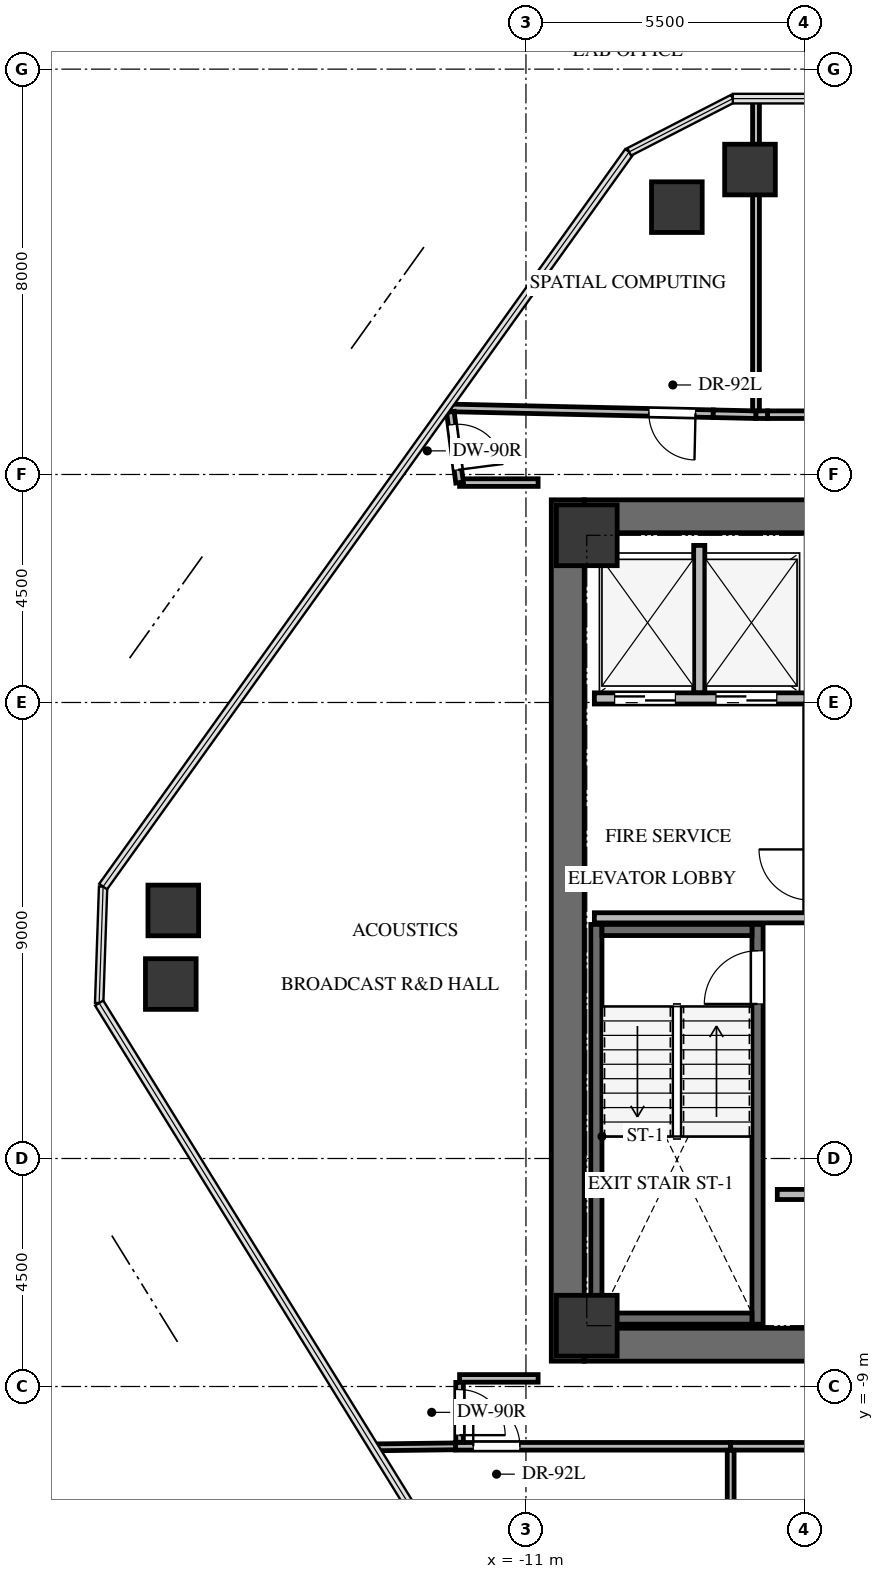
"""IFC4 building model, lengths in metres.
Left out: names, types, materials, properties, quantities, classifications, styles, units other than length and angle.
Written with IfcOpenShell. Run it as: python <this file> out.ifc"""

import sys

from ifc_helpers import new_model, si_unit, direction, frame, frame_2d, origin, origin_2d, place, context, subcontext, project, spatial, rectangle, extrude, source, transform, mapped, element, fill, save


model = new_model("IFC4")
c1 = context("Model", 3, precision=1e-05, world=origin(), true_north=direction((0.0, 1.0)))
c2 = subcontext(c1, "Body", "Model", "MODEL_VIEW")
j1 = project(units=[si_unit("LENGTHUNIT", "METRE"), si_unit("PLANEANGLEUNIT", "RADIAN")], contexts=[c1])
p1 = place(None, origin())
s1 = spatial("IfcSite", under=j1, at=p1, CompositionType="ELEMENT")
p2 = place(p1, origin())
s2 = spatial("IfcBuilding", under=s1, at=p2, CompositionType="ELEMENT")
p3 = place(p2, frame((0.0, 0.0, 159.3)))
s3 = spatial("IfcBuildingStorey", under=s2, at=p3, CompositionType="ELEMENT", Elevation=159.3)
p4 = place(p3, frame((-10.175, -8.5, 0.0), z_axis=(0.0, 0.0, 1.0), x_axis=(0.0, 1.0, 0.0)))
e1 = element("IfcWall", 1, at=p4, inside=s3, PredefinedType="SHEAR", context=c2, shape_type="SweptSolid", body=[
    extrude(rectangle(XDim=17.0, YDim=0.65, at=frame_2d((8.5, 0.0))), origin(), (0.0, 0.0, 1.0), 3.3),
])
p5 = place(p3, frame((-9.85, -8.175, 0.0), z_axis=(0.0, 0.0, 1.0), x_axis=(1.0, 0.0, 0.0)))
e2 = element("IfcWall", 2, at=p5, inside=s3, PredefinedType="SHEAR", context=c2, shape_type="SweptSolid", body=[
    extrude(rectangle(XDim=7.75, YDim=0.65, at=frame_2d((3.875, 0.0))), origin(), (0.0, 0.0, 1.0), 3.3),
])
p6 = place(p3, frame((-9.85, 8.175, 0.0), z_axis=(0.0, 0.0, 1.0), x_axis=(1.0, 0.0, 0.0)))
e3 = element("IfcWall", 3, at=p6, inside=s3, PredefinedType="SHEAR", context=c2, shape_type="SweptSolid", body=[
    extrude(rectangle(XDim=19.7, YDim=0.65, at=frame_2d((9.85, 0.0))), origin(), (0.0, 0.0, 1.0), 3.3),
])
p7 = place(p3, frame((-6.43, -7.77, -0.24), z_axis=(0.0, 0.0, 1.0), x_axis=(0.0, 1.0, 0.0)))
e4 = element("IfcWall", 4, at=p7, inside=s3, PredefinedType="SHEAR", context=c2, shape_type="SweptSolid", body=[
    extrude(rectangle(XDim=7.89, YDim=0.22, at=frame_2d((3.945, 0.0))), origin(), (0.0, 0.0, 1.0), 3.22),
])
p8 = place(p7, frame((6.32, 0.0, 0.0)))
e5 = element("IfcOpeningElement", 5, at=p8, cuts=e4, PredefinedType="OPENING", context=c2, shape_type="SweptSolid", body=[
    extrude(rectangle(XDim=1.05, YDim=2.15, at=frame_2d((0.525, 1.075))), frame((0.0, 0.12, 0.0), z_axis=(0.0, -1.0, 0.0), x_axis=(1.0, 0.0, 0.0)), (0.0, 0.0, 1.0), 0.24),
])
p9 = place(p3, frame((-9.61, 0.12, -0.24), z_axis=(0.0, 0.0, 1.0), x_axis=(0.0, -1.0, 0.0)))
e6 = element("IfcWall", 6, at=p9, inside=s3, PredefinedType="SHEAR", context=c2, shape_type="SweptSolid", body=[
    extrude(rectangle(XDim=7.89, YDim=0.22, at=frame_2d((3.945, 0.0))), origin(), (0.0, 0.0, 1.0), 3.22),
])
for number, where, z_axis, x_axis in (
    (7, (-9.5, -7.66, -0.24), (0.0, 0.0, 1.0), (1.0, 0.0, 0.0)),
    (8, (-6.54, 0.01, -0.24), (0.0, 0.0, 1.0), (-1.0, 0.0, 0.0)),
):
    element("IfcWall", number, at=place(p3, frame(where, z_axis=z_axis, x_axis=x_axis)), inside=s3, PredefinedType="SHEAR", context=c2, shape_type="SweptSolid", body=[
        extrude(rectangle(XDim=2.96, YDim=0.22, at=frame_2d((1.48, 0.0))), origin(), (0.0, 0.0, 1.0), 3.22),
    ])
m1 = source(origin(), c2, "Body", "SweptSolid", [
    extrude(rectangle(XDim=1.2, YDim=1.2, at=origin_2d()), origin(), (0.0, 0.0, 1.0), 3.22),
])
for number, where, z_axis, x_axis in (
    (9, (-9.8, -7.8, -0.24), (0.0, 0.0, 1.0), (1.0, 0.0, 0.0)),
    (10, (-9.8, 7.8, -0.24), (0.0, 0.0, 1.0), (1.0, 0.0, 0.0)),
):
    element("IfcColumn", number, at=place(p3, frame(where, z_axis=z_axis, x_axis=x_axis)), inside=s3, PredefinedType="COLUMN", context=c2, shape_type="MappedRepresentation", body=[
        mapped(m1, transform((0.0, 0.0, 0.0), x_axis=(1.0, 0.0, 0.0), y_axis=(0.0, 1.0, 0.0), z_axis=(0.0, 0.0, 1.0), scale=1.0)),
    ])
m2 = source(origin(), c2, "Body", "SweptSolid", [
    extrude(rectangle(XDim=1.0, YDim=1.0, at=origin_2d()), origin(), (0.0, 0.0, 1.0), 3.22),
])
for number, where, z_axis, x_axis in (
    (11, (-18.009, -1.057, -0.24), (0.0, 0.0, 1.0), (1.0, 0.0, 0.0)),
    (12, (-17.96, 0.396, -0.24), (0.0, 0.0, 1.0), (1.0, 0.0, 0.0)),
    (13, (-8.022, 14.276, -0.24), (0.0, 0.0, 1.0), (1.0, 0.0, 0.0)),
    (14, (-6.579, 15.018, -0.24), (0.0, 0.0, 1.0), (1.0, 0.0, 0.0)),
):
    element("IfcColumn", number, at=place(p3, frame(where, z_axis=z_axis, x_axis=x_axis)), inside=s3, PredefinedType="COLUMN", context=c2, shape_type="MappedRepresentation", body=[
        mapped(m2, transform((0.0, 0.0, 0.0), x_axis=(1.0, 0.0, 0.0), y_axis=(0.0, 1.0, 0.0), z_axis=(0.0, 0.0, 1.0), scale=1.0)),
    ])
p10 = place(p3, frame((-9.65, 4.58, 0.0), z_axis=(0.0, 0.0, 1.0), x_axis=(1.0, 0.0, 0.0)))
e15 = element("IfcWall", 15, at=p10, inside=s3, PredefinedType="SOLIDWALL", context=c2, shape_type="SweptSolid", body=[
    extrude(rectangle(XDim=4.175, YDim=0.22, at=frame_2d((2.087, 0.0))), origin(), (0.0, 0.0, 1.0), 2.965),
])
p11 = place(p10, frame((0.4, 0.0, 0.0)))
e16 = element("IfcOpeningElement", 16, at=p11, cuts=e15, PredefinedType="OPENING", context=c2, shape_type="SweptSolid", body=[
    extrude(rectangle(XDim=1.2, YDim=2.15, at=frame_2d((0.6, 1.075))), frame((0.0, 0.12, 0.0), z_axis=(0.0, -1.0, 0.0), x_axis=(1.0, 0.0, 0.0)), (0.0, 0.0, 1.0), 0.24),
])
p12 = place(p10, frame((2.4, 0.0, 0.0)))
e17 = element("IfcOpeningElement", 17, at=p12, cuts=e15, PredefinedType="OPENING", context=c2, shape_type="SweptSolid", body=[
    extrude(rectangle(XDim=1.2, YDim=2.15, at=frame_2d((0.6, 1.075))), frame((0.0, 0.12, 0.0), z_axis=(0.0, -1.0, 0.0), x_axis=(1.0, 0.0, 0.0)), (0.0, 0.0, 1.0), 0.24),
])
p13 = place(p3, frame((-7.58, 4.694, 0.0), z_axis=(0.0, 0.0, 1.0), x_axis=(0.0, 1.0, 0.0)))
e18 = element("IfcWall", 18, at=p13, inside=s3, PredefinedType="SOLIDWALL", context=c2, shape_type="SweptSolid", body=[
    extrude(rectangle(XDim=2.906, YDim=0.22, at=frame_2d((1.453, 0.0))), origin(), (0.0, 0.0, 1.0), 2.965),
])
p14 = place(p3, frame((-9.65, 0.25, 0.0), z_axis=(0.0, 0.0, 1.0), x_axis=(1.0, 0.0, 0.0)))
e19 = element("IfcWall", 19, at=p14, inside=s3, PredefinedType="SOLIDWALL", context=c2, shape_type="SweptSolid", body=[
    extrude(rectangle(XDim=4.27, YDim=0.2, at=frame_2d((2.135, 0.0))), origin(), (0.0, 0.0, 1.0), 2.965),
])
p15 = place(p3, frame((-6.04, -5.21, 0.0), z_axis=(0.0, 0.0, 1.0), x_axis=(1.0, 0.0, 0.0)))
e20 = element("IfcWall", 20, at=p15, inside=s3, PredefinedType="SOLIDWALL", context=c2, shape_type="SweptSolid", body=[
    extrude(rectangle(XDim=3.53, YDim=0.2, at=frame_2d((1.765, 0.0))), origin(), (0.0, 0.0, 1.0), 2.965),
])
p16 = place(p15, frame((1.315, 0.0, 0.0)))
e21 = element("IfcOpeningElement", 21, at=p16, cuts=e20, PredefinedType="OPENING", context=c2, shape_type="SweptSolid", body=[
    extrude(rectangle(XDim=0.9, YDim=2.05, at=frame_2d((0.45, 1.025))), frame((0.0, 0.11, 0.0), z_axis=(0.0, -1.0, 0.0), x_axis=(1.0, 0.0, 0.0)), (0.0, 0.0, 1.0), 0.22),
])
p17 = place(p3, frame((-7.304, 10.199, 0.0), z_axis=(0.0, 0.0, 1.0), x_axis=(-0.99975438671, 0.022162270975, 0.0)))
e22 = element("IfcWall", 22, at=p17, inside=s3, PredefinedType="PARTITIONING", context=c2, shape_type="SweptSolid", body=[
    extrude(rectangle(XDim=5.277, YDim=0.15, at=frame_2d((2.638, 0.0))), origin(), (0.0, 0.0, 1.0), 2.319),
])
p18 = place(p17, frame((0.35, 0.0, 0.0)))
e23 = element("IfcOpeningElement", 23, at=p18, cuts=e22, PredefinedType="OPENING", context=c2, shape_type="SweptSolid", body=[
    extrude(rectangle(XDim=0.92, YDim=2.1, at=frame_2d((0.46, 1.05))), frame((0.0, 0.085, 0.0), z_axis=(0.0, -1.0, 0.0), x_axis=(1.0, 0.0, 0.0)), (0.0, 0.0, 1.0), 0.17),
])
p19 = place(p3, frame((-6.46, 10.18, 0.0), z_axis=(0.0, 0.0, 1.0), x_axis=(-0.99975203457, 0.022268124577, 0.0)))
e24 = element("IfcWall", 24, at=p19, inside=s3, PredefinedType="PARTITIONING", context=c2, shape_type="SweptSolid", body=[
    extrude(rectangle(XDim=0.844, YDim=0.15, at=frame_2d((0.422, 0.0))), origin(), (0.0, 0.0, 1.0), 2.162),
])
p20 = place(p3, frame((-1.089, 10.18, 0.0), z_axis=(0.0, 0.0, 1.0), x_axis=(-1.0, 0.0, 0.0)))
e25 = element("IfcWall", 25, at=p20, inside=s3, PredefinedType="PARTITIONING", context=c2, shape_type="SweptSolid", body=[
    extrude(rectangle(XDim=5.144, YDim=0.15, at=frame_2d((2.572, 0.0))), origin(), (0.0, 0.0, 1.0), 2.528),
])
p21 = place(p3, frame((-6.233, 10.18, 0.0), z_axis=(0.0, 0.0, 1.0), x_axis=(-1.0, 0.0, 0.0)))
e26 = element("IfcWall", 26, at=p21, inside=s3, PredefinedType="PARTITIONING", context=c2, shape_type="SweptSolid", body=[
    extrude(rectangle(XDim=0.227, YDim=0.15, at=frame_2d((0.114, 0.0))), origin(), (0.0, 0.0, 1.0), 2.162),
])
p22 = place(p3, frame((-12.39, -10.18, 0.0), z_axis=(0.0, 0.0, 1.0), x_axis=(1.0, 0.0, 0.0)))
e27 = element("IfcWall", 27, at=p22, inside=s3, PredefinedType="PARTITIONING", context=c2, shape_type="SweptSolid", body=[
    extrude(rectangle(XDim=5.43, YDim=0.15, at=frame_2d((2.715, 0.0))), origin(), (0.0, 0.0, 1.0), 2.319),
])
p23 = place(p22, frame((0.35, 0.0, 0.0)))
e28 = element("IfcOpeningElement", 28, at=p23, cuts=e27, PredefinedType="OPENING", context=c2, shape_type="SweptSolid", body=[
    extrude(rectangle(XDim=0.92, YDim=2.1, at=frame_2d((0.46, 1.05))), frame((0.0, 0.085, 0.0), z_axis=(0.0, -1.0, 0.0), x_axis=(1.0, 0.0, 0.0)), (0.0, 0.0, 1.0), 0.17),
])
p24 = place(p3, frame((-6.96, -10.18, 0.0), z_axis=(0.0, 0.0, 1.0), x_axis=(1.0, 0.0, 0.0)))
e29 = element("IfcWall", 29, at=p24, inside=s3, PredefinedType="PARTITIONING", context=c2, shape_type="SweptSolid", body=[
    extrude(rectangle(XDim=1.89, YDim=0.15, at=frame_2d((0.945, 0.0))), origin(), (0.0, 0.0, 1.0), 2.965),
])
p25 = place(p3, frame((-10.76, -8.84, 0.0), z_axis=(0.0, 0.0, 1.0), x_axis=(-1.0, 0.0, 0.0)))
e30 = element("IfcWall", 30, at=p25, inside=s3, PredefinedType="PARTITIONING", context=c2, shape_type="SweptSolid", body=[
    extrude(rectangle(XDim=1.55, YDim=0.15, at=frame_2d((0.775, 0.0))), origin(), (0.0, 0.0, 1.0), 2.965),
])
p26 = place(p3, frame((-12.31, -8.919, 0.0), z_axis=(0.0, 0.0, 1.0), x_axis=(0.0, -1.0, 0.0)))
e31 = element("IfcWall", 31, at=p26, inside=s3, PredefinedType="PARTITIONING", context=c2, shape_type="SweptSolid", body=[
    extrude(rectangle(XDim=1.182, YDim=0.15, at=frame_2d((0.591, 0.0))), origin(), (0.0, 0.0, 1.0), 2.319),
])
p27 = place(p26, frame((0.141, 0.0, 0.0)))
e32 = element("IfcOpeningElement", 32, at=p27, cuts=e31, PredefinedType="OPENING", context=c2, shape_type="SweptSolid", body=[
    extrude(rectangle(XDim=0.9, YDim=2.05, at=frame_2d((0.45, 1.025))), frame((0.0, 0.085, 0.0), z_axis=(0.0, -1.0, 0.0), x_axis=(1.0, 0.0, 0.0)), (0.0, 0.0, 1.0), 0.17),
])
p28 = place(p3, frame((-12.31, 8.84, 0.0), z_axis=(0.0, 0.0, 1.0), x_axis=(1.0, 0.0, 0.0)))
e33 = element("IfcWall", 33, at=p28, inside=s3, PredefinedType="PARTITIONING", context=c2, shape_type="SweptSolid", body=[
    extrude(rectangle(XDim=1.55, YDim=0.15, at=frame_2d((0.775, 0.0))), origin(), (0.0, 0.0, 1.0), 2.319),
])
p29 = place(p3, frame((-12.492, 10.235, 0.0), z_axis=(0.0, 0.0, 1.0), x_axis=(0.129331762516, -0.991601379186, 0.0)))
e34 = element("IfcWall", 34, at=p29, inside=s3, PredefinedType="PARTITIONING", context=c2, shape_type="SweptSolid", body=[
    extrude(rectangle(XDim=1.406, YDim=0.15, at=frame_2d((0.703, 0.0))), origin(), (0.0, 0.0, 1.0), 2.965),
])
p30 = place(p29, frame((0.253, 0.0, 0.0)))
e35 = element("IfcOpeningElement", 35, at=p30, cuts=e34, PredefinedType="OPENING", context=c2, shape_type="SweptSolid", body=[
    extrude(rectangle(XDim=0.9, YDim=2.05, at=frame_2d((0.45, 1.025))), frame((0.0, 0.085, 0.0), z_axis=(0.0, -1.0, 0.0), x_axis=(1.0, 0.0, 0.0)), (0.0, 0.0, 1.0), 0.17),
])
p31 = place(p3, frame((-6.46, 16.418, 0.0), z_axis=(0.0, 0.0, 1.0), x_axis=(0.0, -1.0, 0.0)))
e36 = element("IfcWall", 36, at=p31, inside=s3, PredefinedType="PARTITIONING", context=c2, shape_type="SweptSolid", body=[
    extrude(rectangle(XDim=1.316, YDim=0.135, at=frame_2d((0.658, 0.0))), origin(), (0.0, 0.0, 1.0), 1.797),
])
p32 = place(p3, frame((-6.46, 15.079, 0.0), z_axis=(0.0, 0.0, 1.0), x_axis=(0.0, -1.0, 0.0)))
e37 = element("IfcWall", 37, at=p32, inside=s3, PredefinedType="PARTITIONING", context=c2, shape_type="SweptSolid", body=[
    extrude(rectangle(XDim=4.82, YDim=0.135, at=frame_2d((2.41, 0.0))), origin(), (0.0, 0.0, 1.0), 2.162),
])
p33 = place(p3, frame((-6.96, -10.259, 0.0), z_axis=(0.0, 0.0, 1.0), x_axis=(0.0, -1.0, 0.0)))
e38 = element("IfcWall", 38, at=p33, inside=s3, PredefinedType="PARTITIONING", context=c2, shape_type="SweptSolid", body=[
    extrude(rectangle(XDim=2.436, YDim=0.135, at=frame_2d((1.218, 0.0))), origin(), (0.0, 0.0, 1.0), 2.162),
])
p34 = place(p3, frame((-14.004, -10.201, 0.0), z_axis=(0.0, 0.0, 1.0), x_axis=(0.999923084603, 0.012402615782, 0.0)))
e39 = element("IfcWall", 39, at=p34, inside=s3, PredefinedType="PARTITIONING", context=c2, shape_type="SweptSolid", body=[
    extrude(rectangle(XDim=1.614, YDim=0.135, at=frame_2d((0.807, 0.0))), origin(), (0.0, 0.0, 1.0), 2.319),
])
m3 = source(origin(), c2, "Body", "SweptSolid", [
    extrude(rectangle(XDim=1.05, YDim=2.15, at=frame_2d((0.525, 1.075))), frame((0.0, 0.025, 0.0), z_axis=(0.0, -1.0, 0.0), x_axis=(1.0, 0.0, 0.0)), (0.0, 0.0, 1.0), 0.05),
])
p35 = place(p8, origin())
e40 = element("IfcDoor", 40, at=p35, inside=s3, OperationType="SINGLE_SWING_LEFT", PredefinedType="DOOR", context=c2, shape_type="MappedRepresentation", body=[
    mapped(m3, transform((0.0, 0.0, 0.0), x_axis=(1.0, 0.0, 0.0), y_axis=(0.0, 1.0, 0.0), z_axis=(0.0, 0.0, 1.0), scale=1.0)),
])
fill(e5, e40)
m4 = source(origin(), c2, "Body", "SweptSolid", [
    extrude(rectangle(XDim=1.2, YDim=2.15, at=frame_2d((0.6, 1.075))), frame((0.0, 0.025, 0.0), z_axis=(0.0, -1.0, 0.0), x_axis=(1.0, 0.0, 0.0)), (0.0, 0.0, 1.0), 0.05),
])
p36 = place(p11, origin())
e41 = element("IfcDoor", 41, at=p36, inside=s3, OperationType="DOUBLE_DOOR_SLIDING", PredefinedType="DOOR", context=c2, shape_type="MappedRepresentation", body=[
    mapped(m4, transform((0.0, 0.0, 0.0), x_axis=(1.0, 0.0, 0.0), y_axis=(0.0, 1.0, 0.0), z_axis=(0.0, 0.0, 1.0), scale=1.0)),
])
fill(e16, e41)
p37 = place(p12, origin())
e42 = element("IfcDoor", 42, at=p37, inside=s3, OperationType="DOUBLE_DOOR_SLIDING", PredefinedType="DOOR", context=c2, shape_type="MappedRepresentation", body=[
    mapped(m4, transform((0.0, 0.0, 0.0), x_axis=(1.0, 0.0, 0.0), y_axis=(0.0, 1.0, 0.0), z_axis=(0.0, 0.0, 1.0), scale=1.0)),
])
fill(e17, e42)
m5 = source(origin(), c2, "Body", "SweptSolid", [
    extrude(rectangle(XDim=0.92, YDim=2.1, at=frame_2d((0.46, 1.05))), frame((0.0, 0.025, 0.0), z_axis=(0.0, -1.0, 0.0), x_axis=(1.0, 0.0, 0.0)), (0.0, 0.0, 1.0), 0.05),
])
p38 = place(p18, origin())
e43 = element("IfcDoor", 43, at=p38, inside=s3, OperationType="SINGLE_SWING_LEFT", PredefinedType="DOOR", context=c2, shape_type="MappedRepresentation", body=[
    mapped(m5, transform((0.0, 0.0, 0.0), x_axis=(1.0, 0.0, 0.0), y_axis=(0.0, 1.0, 0.0), z_axis=(0.0, 0.0, 1.0), scale=1.0)),
])
fill(e23, e43)
p39 = place(p23, origin())
e44 = element("IfcDoor", 44, at=p39, inside=s3, OperationType="SINGLE_SWING_LEFT", PredefinedType="DOOR", context=c2, shape_type="MappedRepresentation", body=[
    mapped(m5, transform((0.0, 0.0, 0.0), x_axis=(1.0, 0.0, 0.0), y_axis=(0.0, 1.0, 0.0), z_axis=(0.0, 0.0, 1.0), scale=1.0)),
])
fill(e28, e44)
m6 = source(origin(), c2, "Body", "SweptSolid", [
    extrude(rectangle(XDim=0.9, YDim=2.05, at=frame_2d((0.45, 1.025))), frame((0.0, 0.025, 0.0), z_axis=(0.0, -1.0, 0.0), x_axis=(1.0, 0.0, 0.0)), (0.0, 0.0, 1.0), 0.05),
])
p40 = place(p27, origin())
e45 = element("IfcDoor", 45, at=p40, inside=s3, OperationType="SINGLE_SWING_RIGHT", PredefinedType="DOOR", context=c2, shape_type="MappedRepresentation", body=[
    mapped(m6, transform((0.0, 0.0, 0.0), x_axis=(1.0, 0.0, 0.0), y_axis=(0.0, 1.0, 0.0), z_axis=(0.0, 0.0, 1.0), scale=1.0)),
])
fill(e32, e45)
p41 = place(p30, origin())
e46 = element("IfcDoor", 46, at=p41, inside=s3, OperationType="SINGLE_SWING_RIGHT", PredefinedType="DOOR", context=c2, shape_type="MappedRepresentation", body=[
    mapped(m6, transform((0.0, 0.0, 0.0), x_axis=(1.0, 0.0, 0.0), y_axis=(0.0, 1.0, 0.0), z_axis=(0.0, 0.0, 1.0), scale=1.0)),
])
fill(e35, e46)
save(model, sys.argv[1])
